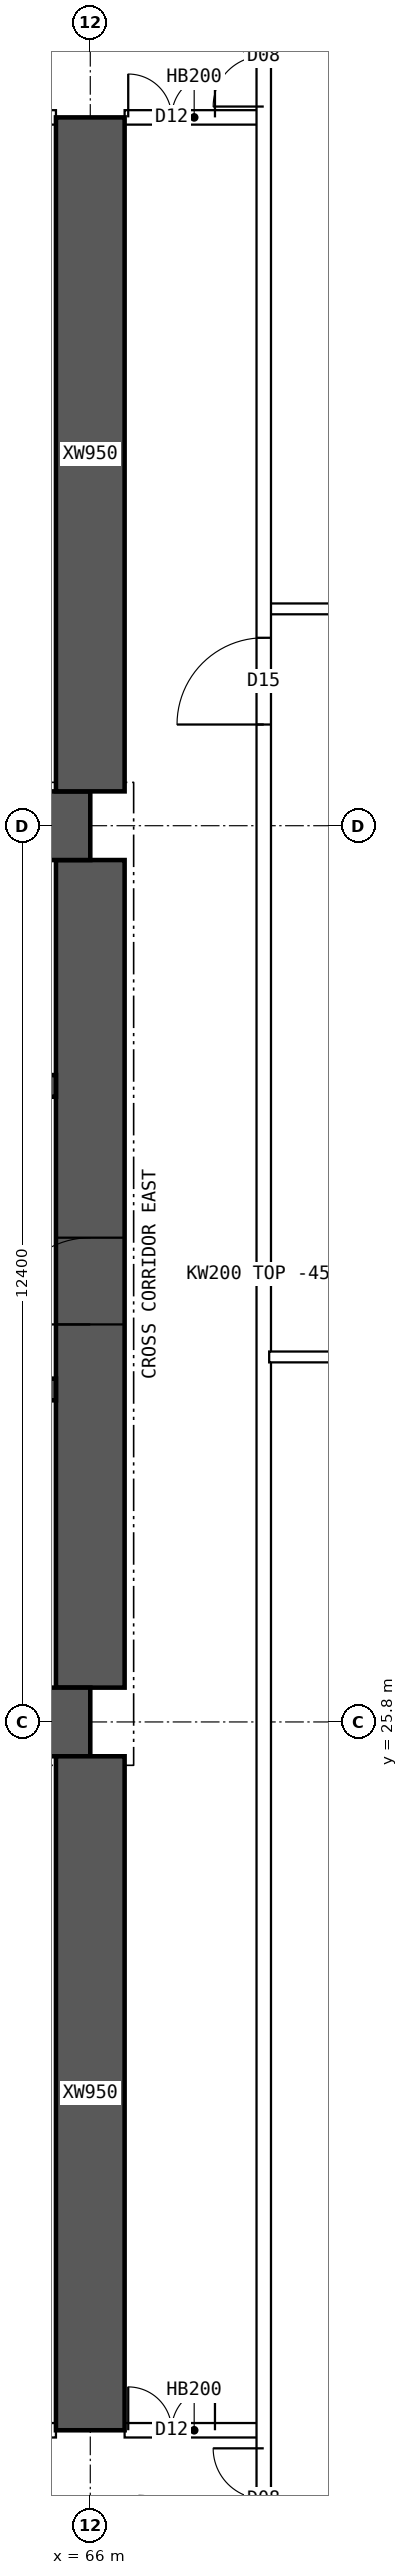
"""IFC4 building model, lengths in metres.
Left out: names, types, materials, properties, quantities, classifications, styles, units other than length and angle.
Written with IfcOpenShell. Run it as: python <this file> out.ifc"""

import sys

from ifc_helpers import new_model, si_unit, direction, frame, frame_2d, origin, place, context, subcontext, project, spatial, polyline, rectangle, outline, extrude, element, fill, save


model = new_model("IFC4")
c1 = context("Model", 3, precision=1e-05, world=origin(), true_north=direction((0.0, 1.0)))
c2 = subcontext(c1, "Body", "Model", "MODEL_VIEW")
j1 = project(units=[si_unit("LENGTHUNIT", "METRE"), si_unit("PLANEANGLEUNIT", "RADIAN")], contexts=[c1])
p1 = place(None, origin())
s1 = spatial("IfcSite", under=j1, at=p1, CompositionType="ELEMENT")
p2 = place(p1, origin())
s2 = spatial("IfcBuilding", under=s1, at=p2, CompositionType="ELEMENT")
p3 = place(p2, frame((0.0, 0.0, 80.65)))
s3 = spatial("IfcBuildingStorey", under=s2, at=p3, CompositionType="ELEMENT", Elevation=80.65)
for number, where, z_axis, x_axis in (
    (1, (18.0, 25.8, 0.0), (0.0, 0.0, 1.0), (1.0, 0.0, 0.0)),
    (2, (18.0, 38.2, 0.0), (0.0, 0.0, 1.0), (1.0, 0.0, 0.0)),
):
    element("IfcWall", number, at=place(p3, frame(where, z_axis=z_axis, x_axis=x_axis)), inside=s3, PredefinedType="SHEAR", context=c2, shape_type="SweptSolid", body=[
        extrude(rectangle(XDim=48.0, YDim=0.95, at=frame_2d((24.0, 0.0))), origin(), (0.0, 0.0, 1.0), 3.75),
    ])
p4 = place(p3, frame((66.0, 26.275, 0.0), z_axis=(0.0, 0.0, 1.0), x_axis=(0.0, 1.0, 0.0)))
e3 = element("IfcWall", 3, at=p4, inside=s3, PredefinedType="SHEAR", context=c2, shape_type="SweptSolid", body=[
    extrude(rectangle(XDim=11.45, YDim=0.95, at=frame_2d((5.725, 0.0))), origin(), (0.0, 0.0, 1.0), 3.75),
])
p5 = place(p4, frame((5.025, 0.0, 0.0)))
e4 = element("IfcOpeningElement", 4, at=p5, cuts=e3, PredefinedType="OPENING", context=c2, shape_type="SweptSolid", body=[
    extrude(rectangle(XDim=1.2, YDim=2.1, at=frame_2d((0.6, 1.05))), frame((0.0, 0.485, 0.0), z_axis=(0.0, -1.0, 0.0), x_axis=(1.0, 0.0, 0.0)), (0.0, 0.0, 1.0), 0.97),
])
p6 = place(p3, frame((18.475, 30.4, 0.0), z_axis=(0.0, 0.0, 1.0), x_axis=(1.0, 0.0, 0.0)))
e5 = element("IfcWall", 5, at=p6, inside=s3, PredefinedType="SHEAR", context=c2, shape_type="SweptSolid", body=[
    extrude(rectangle(XDim=47.05, YDim=0.3, at=frame_2d((23.525, 0.0))), origin(), (0.0, 0.0, 1.0), 3.75),
])
p7 = place(p6, frame((0.4, 0.0, 0.0)))
e6 = element("IfcOpeningElement", 6, at=p7, cuts=e5, PredefinedType="OPENING", context=c2, shape_type="SweptSolid", body=[
    extrude(rectangle(XDim=1.0, YDim=2.1, at=frame_2d((0.5, 1.05))), frame((0.0, 0.16, 0.0), z_axis=(0.0, -1.0, 0.0), x_axis=(1.0, 0.0, 0.0)), (0.0, 0.0, 1.0), 0.32),
])
p8 = place(p6, frame((45.65, 0.0, 0.0)))
e7 = element("IfcOpeningElement", 7, at=p8, cuts=e5, PredefinedType="OPENING", context=c2, shape_type="SweptSolid", body=[
    extrude(rectangle(XDim=1.0, YDim=2.1, at=frame_2d((0.5, 1.05))), frame((0.0, 0.16, 0.0), z_axis=(0.0, -1.0, 0.0), x_axis=(1.0, 0.0, 0.0)), (0.0, 0.0, 1.0), 0.32),
])
p9 = place(p6, frame((8.275, 0.0, 0.0)))
e8 = element("IfcOpeningElement", 8, at=p9, cuts=e5, PredefinedType="OPENING", context=c2, shape_type="SweptSolid", body=[
    extrude(rectangle(XDim=1.1, YDim=2.1, at=frame_2d((0.55, 1.05))), frame((0.0, 0.16, 0.0), z_axis=(0.0, -1.0, 0.0), x_axis=(1.0, 0.0, 0.0)), (0.0, 0.0, 1.0), 0.32),
])
p10 = place(p6, frame((10.875, 0.0, 0.0)))
e9 = element("IfcOpeningElement", 9, at=p10, cuts=e5, PredefinedType="OPENING", context=c2, shape_type="SweptSolid", body=[
    extrude(rectangle(XDim=1.1, YDim=2.1, at=frame_2d((0.55, 1.05))), frame((0.0, 0.16, 0.0), z_axis=(0.0, -1.0, 0.0), x_axis=(1.0, 0.0, 0.0)), (0.0, 0.0, 1.0), 0.32),
])
p11 = place(p6, frame((13.475, 0.0, 0.0)))
e10 = element("IfcOpeningElement", 10, at=p11, cuts=e5, PredefinedType="OPENING", context=c2, shape_type="SweptSolid", body=[
    extrude(rectangle(XDim=1.1, YDim=2.1, at=frame_2d((0.55, 1.05))), frame((0.0, 0.16, 0.0), z_axis=(0.0, -1.0, 0.0), x_axis=(1.0, 0.0, 0.0)), (0.0, 0.0, 1.0), 0.32),
])
p12 = place(p6, frame((16.075, 0.0, 0.0)))
e11 = element("IfcOpeningElement", 11, at=p12, cuts=e5, PredefinedType="OPENING", context=c2, shape_type="SweptSolid", body=[
    extrude(rectangle(XDim=1.1, YDim=2.1, at=frame_2d((0.55, 1.05))), frame((0.0, 0.16, 0.0), z_axis=(0.0, -1.0, 0.0), x_axis=(1.0, 0.0, 0.0)), (0.0, 0.0, 1.0), 0.32),
])
p13 = place(p6, frame((30.142, 0.0, 0.0)))
e12 = element("IfcOpeningElement", 12, at=p13, cuts=e5, PredefinedType="OPENING", context=c2, shape_type="SweptSolid", body=[
    extrude(rectangle(XDim=1.1, YDim=2.1, at=frame_2d((0.55, 1.05))), frame((0.0, 0.16, 0.0), z_axis=(0.0, -1.0, 0.0), x_axis=(1.0, 0.0, 0.0)), (0.0, 0.0, 1.0), 0.32),
])
p14 = place(p6, frame((33.675, 0.0, 0.0)))
e13 = element("IfcOpeningElement", 13, at=p14, cuts=e5, PredefinedType="OPENING", context=c2, shape_type="SweptSolid", body=[
    extrude(rectangle(XDim=1.1, YDim=2.1, at=frame_2d((0.55, 1.05))), frame((0.0, 0.16, 0.0), z_axis=(0.0, -1.0, 0.0), x_axis=(1.0, 0.0, 0.0)), (0.0, 0.0, 1.0), 0.32),
])
p15 = place(p6, frame((37.208, 0.0, 0.0)))
e14 = element("IfcOpeningElement", 14, at=p15, cuts=e5, PredefinedType="OPENING", context=c2, shape_type="SweptSolid", body=[
    extrude(rectangle(XDim=1.1, YDim=2.1, at=frame_2d((0.55, 1.05))), frame((0.0, 0.16, 0.0), z_axis=(0.0, -1.0, 0.0), x_axis=(1.0, 0.0, 0.0)), (0.0, 0.0, 1.0), 0.32),
])
p16 = place(p3, frame((18.475, 34.6, 0.0), z_axis=(0.0, 0.0, 1.0), x_axis=(1.0, 0.0, 0.0)))
e15 = element("IfcWall", 15, at=p16, inside=s3, PredefinedType="SHEAR", context=c2, shape_type="SweptSolid", body=[
    extrude(rectangle(XDim=47.05, YDim=0.3, at=frame_2d((23.525, 0.0))), origin(), (0.0, 0.0, 1.0), 3.75),
])
p17 = place(p16, frame((0.9, 0.0, 0.0)))
e16 = element("IfcOpeningElement", 16, at=p17, cuts=e15, PredefinedType="OPENING", context=c2, shape_type="SweptSolid", body=[
    extrude(rectangle(XDim=1.1, YDim=2.1, at=frame_2d((0.55, 1.05))), frame((0.0, 0.16, 0.0), z_axis=(0.0, -1.0, 0.0), x_axis=(1.0, 0.0, 0.0)), (0.0, 0.0, 1.0), 0.32),
])
p18 = place(p16, frame((45.05, 0.0, 0.0)))
e17 = element("IfcOpeningElement", 17, at=p18, cuts=e15, PredefinedType="OPENING", context=c2, shape_type="SweptSolid", body=[
    extrude(rectangle(XDim=1.1, YDim=2.1, at=frame_2d((0.55, 1.05))), frame((0.0, 0.16, 0.0), z_axis=(0.0, -1.0, 0.0), x_axis=(1.0, 0.0, 0.0)), (0.0, 0.0, 1.0), 0.32),
])
p19 = place(p16, frame((4.125, 0.0, 0.0)))
e18 = element("IfcOpeningElement", 18, at=p19, cuts=e15, PredefinedType="OPENING", context=c2, shape_type="SweptSolid", body=[
    extrude(rectangle(XDim=0.9, YDim=2.1, at=frame_2d((0.45, 1.05))), frame((0.0, 0.16, 0.0), z_axis=(0.0, -1.0, 0.0), x_axis=(1.0, 0.0, 0.0)), (0.0, 0.0, 1.0), 0.32),
])
p20 = place(p16, frame((42.025, 0.0, 0.0)))
e19 = element("IfcOpeningElement", 19, at=p20, cuts=e15, PredefinedType="OPENING", context=c2, shape_type="SweptSolid", body=[
    extrude(rectangle(XDim=0.9, YDim=2.1, at=frame_2d((0.45, 1.05))), frame((0.0, 0.16, 0.0), z_axis=(0.0, -1.0, 0.0), x_axis=(1.0, 0.0, 0.0)), (0.0, 0.0, 1.0), 0.32),
])
p21 = place(p16, frame((8.9, 0.0, 0.0)))
e20 = element("IfcOpeningElement", 20, at=p21, cuts=e15, PredefinedType="OPENING", context=c2, shape_type="SweptSolid", body=[
    extrude(rectangle(XDim=0.9, YDim=2.1, at=frame_2d((0.45, 1.05))), frame((0.0, 0.16, 0.0), z_axis=(0.0, -1.0, 0.0), x_axis=(1.0, 0.0, 0.0)), (0.0, 0.0, 1.0), 0.32),
])
p22 = place(p16, frame((12.874, 0.0, 0.0)))
e21 = element("IfcOpeningElement", 21, at=p22, cuts=e15, PredefinedType="OPENING", context=c2, shape_type="SweptSolid", body=[
    extrude(rectangle(XDim=0.9, YDim=2.1, at=frame_2d((0.45, 1.05))), frame((0.0, 0.16, 0.0), z_axis=(0.0, -1.0, 0.0), x_axis=(1.0, 0.0, 0.0)), (0.0, 0.0, 1.0), 0.32),
])
p23 = place(p16, frame((16.521, 0.0, 0.0)))
e22 = element("IfcOpeningElement", 22, at=p23, cuts=e15, PredefinedType="OPENING", context=c2, shape_type="SweptSolid", body=[
    extrude(rectangle(XDim=0.9, YDim=2.1, at=frame_2d((0.45, 1.05))), frame((0.0, 0.16, 0.0), z_axis=(0.0, -1.0, 0.0), x_axis=(1.0, 0.0, 0.0)), (0.0, 0.0, 1.0), 0.32),
])
p24 = place(p16, frame((20.28, 0.0, 0.0)))
e23 = element("IfcOpeningElement", 23, at=p24, cuts=e15, PredefinedType="OPENING", context=c2, shape_type="SweptSolid", body=[
    extrude(rectangle(XDim=0.9, YDim=2.1, at=frame_2d((0.45, 1.05))), frame((0.0, 0.16, 0.0), z_axis=(0.0, -1.0, 0.0), x_axis=(1.0, 0.0, 0.0)), (0.0, 0.0, 1.0), 0.32),
])
p25 = place(p16, frame((24.686, 0.0, 0.0)))
e24 = element("IfcOpeningElement", 24, at=p25, cuts=e15, PredefinedType="OPENING", context=c2, shape_type="SweptSolid", body=[
    extrude(rectangle(XDim=0.9, YDim=2.1, at=frame_2d((0.45, 1.05))), frame((0.0, 0.16, 0.0), z_axis=(0.0, -1.0, 0.0), x_axis=(1.0, 0.0, 0.0)), (0.0, 0.0, 1.0), 0.32),
])
p26 = place(p16, frame((27.483, 0.0, 0.0)))
e25 = element("IfcOpeningElement", 25, at=p26, cuts=e15, PredefinedType="OPENING", context=c2, shape_type="SweptSolid", body=[
    extrude(rectangle(XDim=0.9, YDim=2.1, at=frame_2d((0.45, 1.05))), frame((0.0, 0.16, 0.0), z_axis=(0.0, -1.0, 0.0), x_axis=(1.0, 0.0, 0.0)), (0.0, 0.0, 1.0), 0.32),
])
p27 = place(p16, frame((29.45, 0.0, 0.0)))
e26 = element("IfcOpeningElement", 26, at=p27, cuts=e15, PredefinedType="OPENING", context=c2, shape_type="SweptSolid", body=[
    extrude(rectangle(XDim=0.9, YDim=2.1, at=frame_2d((0.45, 1.05))), frame((0.0, 0.16, 0.0), z_axis=(0.0, -1.0, 0.0), x_axis=(1.0, 0.0, 0.0)), (0.0, 0.0, 1.0), 0.32),
])
p28 = place(p16, frame((31.882, 0.0, 0.0)))
e27 = element("IfcOpeningElement", 27, at=p28, cuts=e15, PredefinedType="OPENING", context=c2, shape_type="SweptSolid", body=[
    extrude(rectangle(XDim=0.9, YDim=2.1, at=frame_2d((0.45, 1.05))), frame((0.0, 0.16, 0.0), z_axis=(0.0, -1.0, 0.0), x_axis=(1.0, 0.0, 0.0)), (0.0, 0.0, 1.0), 0.32),
])
p29 = place(p16, frame((34.617, 0.0, 0.0)))
e28 = element("IfcOpeningElement", 28, at=p29, cuts=e15, PredefinedType="OPENING", context=c2, shape_type="SweptSolid", body=[
    extrude(rectangle(XDim=0.9, YDim=2.1, at=frame_2d((0.45, 1.05))), frame((0.0, 0.16, 0.0), z_axis=(0.0, -1.0, 0.0), x_axis=(1.0, 0.0, 0.0)), (0.0, 0.0, 1.0), 0.32),
])
p30 = place(p16, frame((37.656, 0.0, 0.0)))
e29 = element("IfcOpeningElement", 29, at=p30, cuts=e15, PredefinedType="OPENING", context=c2, shape_type="SweptSolid", body=[
    extrude(rectangle(XDim=0.9, YDim=2.1, at=frame_2d((0.45, 1.05))), frame((0.0, 0.16, 0.0), z_axis=(0.0, -1.0, 0.0), x_axis=(1.0, 0.0, 0.0)), (0.0, 0.0, 1.0), 0.32),
])
for number, where, z_axis, x_axis in (
    (30, (66.0, 16.0, 0.0), (0.0, 0.0, 1.0), (0.0, 1.0, 0.0)),
    (31, (66.0, 38.675, 0.0), (0.0, 0.0, 1.0), (0.0, 1.0, 0.0)),
):
    element("IfcWall", number, at=place(p3, frame(where, z_axis=z_axis, x_axis=x_axis)), inside=s3, PredefinedType="SHEAR", context=c2, shape_type="SweptSolid", body=[
        extrude(rectangle(XDim=9.325, YDim=0.95, at=frame_2d((4.663, 0.0))), origin(), (0.0, 0.0, 1.0), 3.75),
    ])
p31 = place(p3, frame((60.475, 16.0, 0.0), z_axis=(0.0, 0.0, 1.0), x_axis=(1.0, 0.0, 0.0)))
e32 = element("IfcWall", 32, at=p31, inside=s3, PredefinedType="SOLIDWALL", context=c2, shape_type="SweptSolid", body=[
    extrude(rectangle(XDim=5.05, YDim=0.2, at=frame_2d((2.525, 0.0))), origin(), (0.0, 0.0, 1.0), 3.3),
])
p32 = place(p31, frame((0.15, 0.0, 0.0)))
e33 = element("IfcOpeningElement", 33, at=p32, cuts=e32, PredefinedType="OPENING", context=c2, shape_type="SweptSolid", body=[
    extrude(rectangle(XDim=0.9, YDim=2.1, at=frame_2d((0.45, 1.05))), frame((0.0, 0.11, 0.0), z_axis=(0.0, -1.0, 0.0), x_axis=(1.0, 0.0, 0.0)), (0.0, 0.0, 1.0), 0.22),
])
p33 = place(p31, frame((3.345, 0.0, 0.0)))
e34 = element("IfcOpeningElement", 34, at=p33, cuts=e32, PredefinedType="OPENING", context=c2, shape_type="SweptSolid", body=[
    extrude(rectangle(XDim=0.9, YDim=2.1, at=frame_2d((0.45, 1.05))), frame((0.0, 0.11, 0.0), z_axis=(0.0, -1.0, 0.0), x_axis=(1.0, 0.0, 0.0)), (0.0, 0.0, 1.0), 0.22),
])
p34 = place(p3, frame((66.475, 16.0, 0.0), z_axis=(0.0, 0.0, 1.0), x_axis=(1.0, 0.0, 0.0)))
e35 = element("IfcWall", 35, at=p34, inside=s3, PredefinedType="SOLIDWALL", context=c2, shape_type="SweptSolid", body=[
    extrude(rectangle(XDim=1.925, YDim=0.2, at=frame_2d((0.962, 0.0))), origin(), (0.0, 0.0, 1.0), 3.3),
])
p35 = place(p34, frame((0.05, 0.0, 0.0)))
e36 = element("IfcOpeningElement", 36, at=p35, cuts=e35, PredefinedType="OPENING", context=c2, shape_type="SweptSolid", body=[
    extrude(rectangle(XDim=1.2, YDim=2.1, at=frame_2d((0.6, 1.05))), frame((0.0, 0.11, 0.0), z_axis=(0.0, -1.0, 0.0), x_axis=(1.0, 0.0, 0.0)), (0.0, 0.0, 1.0), 0.22),
])
p36 = place(p3, frame((60.475, 48.0, 0.0), z_axis=(0.0, 0.0, 1.0), x_axis=(1.0, 0.0, 0.0)))
e37 = element("IfcWall", 37, at=p36, inside=s3, PredefinedType="SOLIDWALL", context=c2, shape_type="SweptSolid", body=[
    extrude(rectangle(XDim=5.05, YDim=0.2, at=frame_2d((2.525, 0.0))), origin(), (0.0, 0.0, 1.0), 3.3),
])
p37 = place(p36, frame((0.15, 0.0, 0.0)))
e38 = element("IfcOpeningElement", 38, at=p37, cuts=e37, PredefinedType="OPENING", context=c2, shape_type="SweptSolid", body=[
    extrude(rectangle(XDim=0.9, YDim=2.1, at=frame_2d((0.45, 1.05))), frame((0.0, 0.11, 0.0), z_axis=(0.0, -1.0, 0.0), x_axis=(1.0, 0.0, 0.0)), (0.0, 0.0, 1.0), 0.22),
])
p38 = place(p36, frame((2.315, 0.0, 0.0)))
e39 = element("IfcOpeningElement", 39, at=p38, cuts=e37, PredefinedType="OPENING", context=c2, shape_type="SweptSolid", body=[
    extrude(rectangle(XDim=0.9, YDim=2.1, at=frame_2d((0.45, 1.05))), frame((0.0, 0.11, 0.0), z_axis=(0.0, -1.0, 0.0), x_axis=(1.0, 0.0, 0.0)), (0.0, 0.0, 1.0), 0.22),
])
p39 = place(p3, frame((66.475, 48.0, 0.0), z_axis=(0.0, 0.0, 1.0), x_axis=(1.0, 0.0, 0.0)))
e40 = element("IfcWall", 40, at=p39, inside=s3, PredefinedType="SOLIDWALL", context=c2, shape_type="SweptSolid", body=[
    extrude(rectangle(XDim=1.925, YDim=0.2, at=frame_2d((0.962, 0.0))), origin(), (0.0, 0.0, 1.0), 3.3),
])
p40 = place(p39, frame((0.05, 0.0, 0.0)))
e41 = element("IfcOpeningElement", 41, at=p40, cuts=e40, PredefinedType="OPENING", context=c2, shape_type="SweptSolid", body=[
    extrude(rectangle(XDim=1.2, YDim=2.1, at=frame_2d((0.6, 1.05))), frame((0.0, 0.11, 0.0), z_axis=(0.0, -1.0, 0.0), x_axis=(1.0, 0.0, 0.0)), (0.0, 0.0, 1.0), 0.22),
])
p41 = place(p3, frame((68.475, 30.85, 0.0), z_axis=(0.0, 0.0, 1.0), x_axis=(1.0, 0.0, 0.0)))
e42 = element("IfcWall", 42, at=p41, inside=s3, PredefinedType="PARTITIONING", context=c2, shape_type="SweptSolid", body=[
    extrude(outline(polyline([(0.0, 0.0), (6.82, 0.0), (6.82, 3.3), (3.827, 3.3), (3.825, 2.85), (3.227, 2.85), (3.225, 3.3), (0.0, 3.3), (0.0, 0.0)])), frame((0.0, 0.075, 0.0), z_axis=(0.0, -1.0, 0.0), x_axis=(1.0, 0.0, 0.0)), (0.0, 0.0, 1.0), 0.15),
])
p42 = place(p3, frame((68.4, 9.405, 0.0), z_axis=(0.0, 0.0, 1.0), x_axis=(0.0, 1.0, 0.0)))
e43 = element("IfcWall", 43, at=p42, inside=s3, PredefinedType="SOLIDWALL", context=c2, shape_type="SweptSolid", body=[
    extrude(rectangle(XDim=45.189, YDim=0.2, at=frame_2d((22.595, 0.0))), origin(), (0.0, 0.0, 1.0), 3.3),
])
p43 = place(p42, frame((30.195, 0.0, 0.0)))
e44 = element("IfcOpeningElement", 44, at=p43, cuts=e43, PredefinedType="OPENING", context=c2, shape_type="SweptSolid", body=[
    extrude(rectangle(XDim=1.2, YDim=2.1, at=frame_2d((0.6, 1.05))), frame((0.0, 0.11, 0.0), z_axis=(0.0, -1.0, 0.0), x_axis=(1.0, 0.0, 0.0)), (0.0, 0.0, 1.0), 0.22),
])
p44 = place(p42, frame((4.945, 0.0, 0.0)))
e45 = element("IfcOpeningElement", 45, at=p44, cuts=e43, PredefinedType="OPENING", context=c2, shape_type="SweptSolid", body=[
    extrude(rectangle(XDim=1.4, YDim=2.1, at=frame_2d((0.7, 1.05))), frame((0.0, 0.11, 0.0), z_axis=(0.0, -1.0, 0.0), x_axis=(1.0, 0.0, 0.0)), (0.0, 0.0, 1.0), 0.22),
])
p45 = place(p42, frame((38.745, 0.0, 0.0)))
e46 = element("IfcOpeningElement", 46, at=p45, cuts=e43, PredefinedType="OPENING", context=c2, shape_type="SweptSolid", body=[
    extrude(rectangle(XDim=1.4, YDim=2.1, at=frame_2d((0.7, 1.05))), frame((0.0, 0.11, 0.0), z_axis=(0.0, -1.0, 0.0), x_axis=(1.0, 0.0, 0.0)), (0.0, 0.0, 1.0), 0.22),
])
p46 = place(p3, frame((68.475, 41.2, 0.0), z_axis=(0.0, 0.0, 1.0), x_axis=(1.0, 0.0, 0.0)))
e47 = element("IfcWall", 47, at=p46, inside=s3, PredefinedType="PARTITIONING", context=c2, shape_type="SweptSolid", body=[
    extrude(outline(polyline([(0.0, 0.0), (6.82, 0.0), (6.82, 3.3), (3.827, 3.3), (3.825, 2.85), (3.227, 2.85), (3.225, 3.3), (0.0, 3.3), (0.0, 0.0)])), frame((0.0, 0.075, 0.0), z_axis=(0.0, -1.0, 0.0), x_axis=(1.0, 0.0, 0.0)), (0.0, 0.0, 1.0), 0.15),
])
p47 = place(p5, origin())
e48 = element("IfcDoor", 48, at=p47, inside=s3, OperationType="SINGLE_SWING_LEFT", PredefinedType="DOOR", context=c2, shape_type="SweptSolid", body=[
    extrude(rectangle(XDim=1.2, YDim=2.1, at=frame_2d((0.6, 1.05))), frame((0.0, 0.025, 0.0), z_axis=(0.0, -1.0, 0.0), x_axis=(1.0, 0.0, 0.0)), (0.0, 0.0, 1.0), 0.05),
])
fill(e4, e48)
p48 = place(p35, origin())
e49 = element("IfcDoor", 49, at=p48, inside=s3, OperationType="DOUBLE_DOOR_SINGLE_SWING", PredefinedType="DOOR", context=c2, shape_type="SweptSolid", body=[
    extrude(rectangle(XDim=1.2, YDim=2.1, at=frame_2d((0.6, 1.05))), frame((0.0, 0.025, 0.0), z_axis=(0.0, -1.0, 0.0), x_axis=(1.0, 0.0, 0.0)), (0.0, 0.0, 1.0), 0.05),
])
fill(e36, e49)
p49 = place(p40, origin())
e50 = element("IfcDoor", 50, at=p49, inside=s3, OperationType="DOUBLE_DOOR_SINGLE_SWING", PredefinedType="DOOR", context=c2, shape_type="SweptSolid", body=[
    extrude(rectangle(XDim=1.2, YDim=2.1, at=frame_2d((0.6, 1.05))), frame((0.0, 0.025, 0.0), z_axis=(0.0, -1.0, 0.0), x_axis=(1.0, 0.0, 0.0)), (0.0, 0.0, 1.0), 0.05),
])
fill(e41, e50)
p50 = place(p43, origin())
e51 = element("IfcDoor", 51, at=p50, inside=s3, OperationType="SINGLE_SWING_LEFT", PredefinedType="DOOR", context=c2, shape_type="SweptSolid", body=[
    extrude(rectangle(XDim=1.2, YDim=2.1, at=frame_2d((0.6, 1.05))), frame((0.0, 0.025, 0.0), z_axis=(0.0, -1.0, 0.0), x_axis=(1.0, 0.0, 0.0)), (0.0, 0.0, 1.0), 0.05),
])
fill(e44, e51)
p51 = place(p44, origin())
e52 = element("IfcDoor", 52, at=p51, inside=s3, OperationType="DOUBLE_DOOR_SINGLE_SWING", PredefinedType="DOOR", context=c2, shape_type="SweptSolid", body=[
    extrude(rectangle(XDim=1.4, YDim=2.1, at=frame_2d((0.7, 1.05))), frame((0.0, 0.025, 0.0), z_axis=(0.0, -1.0, 0.0), x_axis=(1.0, 0.0, 0.0)), (0.0, 0.0, 1.0), 0.05),
])
fill(e45, e52)
p52 = place(p45, origin())
e53 = element("IfcDoor", 53, at=p52, inside=s3, OperationType="DOUBLE_DOOR_SINGLE_SWING", PredefinedType="DOOR", context=c2, shape_type="SweptSolid", body=[
    extrude(rectangle(XDim=1.4, YDim=2.1, at=frame_2d((0.7, 1.05))), frame((0.0, 0.025, 0.0), z_axis=(0.0, -1.0, 0.0), x_axis=(1.0, 0.0, 0.0)), (0.0, 0.0, 1.0), 0.05),
])
fill(e46, e53)
save(model, sys.argv[1])
